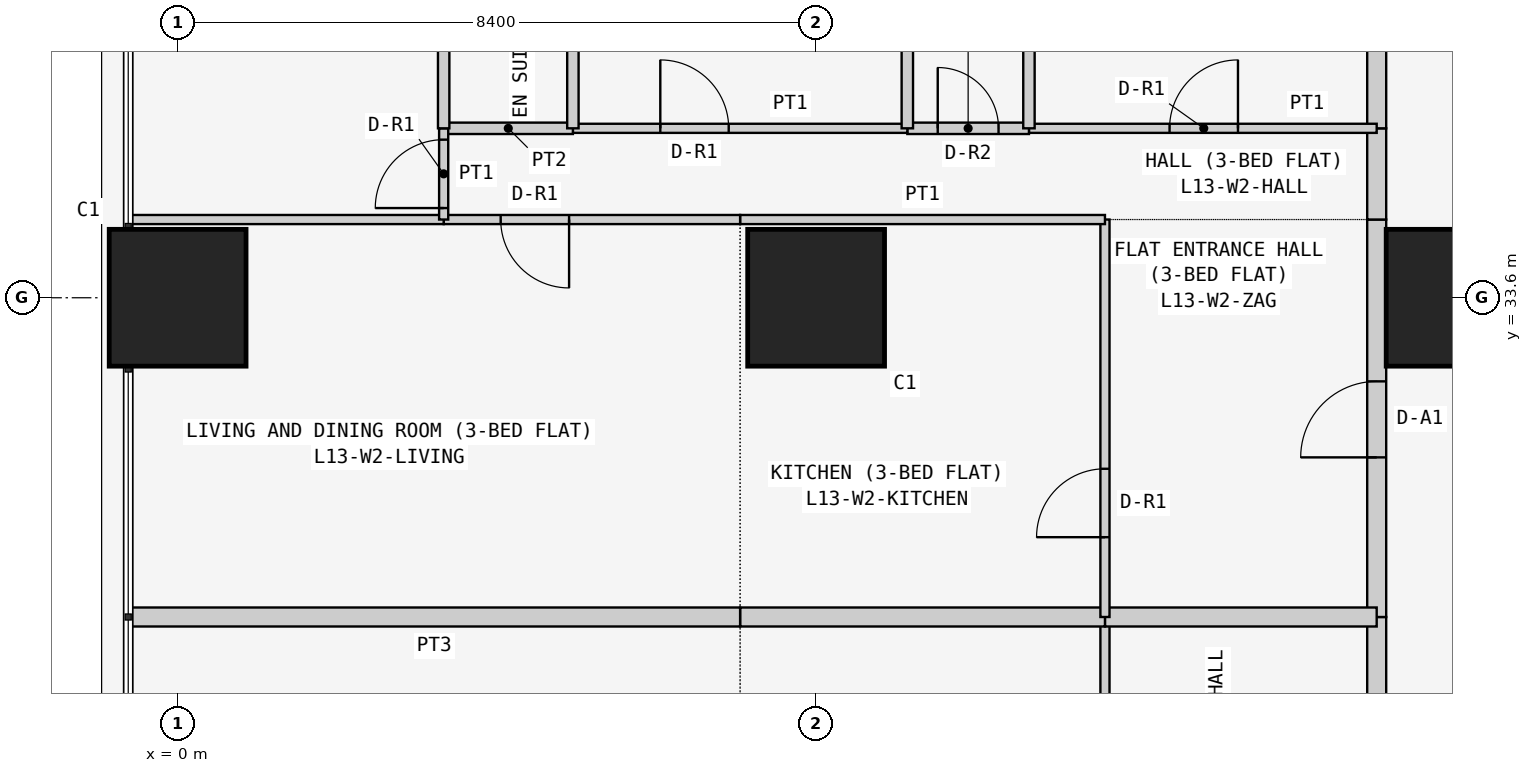
"""IFC4 building model, lengths in metres.
Left out: names, types, materials, properties, quantities, classifications, styles, units other than length and angle.
Written with IfcOpenShell. Run it as: python <this file> out.ifc"""

import sys

from ifc_helpers import new_model, si_unit, direction, frame, frame_2d, origin, origin_2d, place, context, subcontext, project, spatial, rectangle, extrude, element, fill, save


model = new_model("IFC4")
c1 = context("Model", 3, precision=1e-05, world=origin(), true_north=direction((0.0, 1.0)))
c2 = subcontext(c1, "Body", "Model", "MODEL_VIEW")
j1 = project(units=[si_unit("LENGTHUNIT", "METRE"), si_unit("PLANEANGLEUNIT", "RADIAN")], contexts=[c1])
p1 = place(None, origin())
s1 = spatial("IfcSite", under=j1, at=p1, CompositionType="ELEMENT")
p2 = place(p1, origin())
s2 = spatial("IfcBuilding", under=s1, at=p2, CompositionType="ELEMENT")
p3 = place(p2, frame((0.0, 0.0, 56.1)))
s3 = spatial("IfcBuildingStorey", under=s2, at=p3, CompositionType="ELEMENT", Elevation=56.1)
for number, where, z_axis, x_axis in (
    (1, (0.0, 33.6, 0.0), (0.0, 0.0, 1.0), (1.0, 0.0, 0.0)),
    (2, (8.4, 33.6, 0.0), (0.0, 0.0, 1.0), (1.0, 0.0, 0.0)),
    (3, (16.8, 33.6, 0.0), (0.0, 0.0, 1.0), (1.0, 0.0, 0.0)),
):
    element("IfcColumn", number, at=place(p3, frame(where, z_axis=z_axis, x_axis=x_axis)), inside=s3, PredefinedType="COLUMN", context=c2, shape_type="SweptSolid", body=[
        extrude(rectangle(XDim=1.8, YDim=1.8, at=origin_2d()), origin(), (0.0, 0.0, 1.0), 3.6),
    ])
p4 = place(p3, frame((15.775, 24.171, 0.0), z_axis=(0.0, 0.0, 1.0), x_axis=(0.0, 1.0, 0.0)))
e4 = element("IfcWall", 4, at=p4, inside=s3, PredefinedType="PARTITIONING", context=c2, shape_type="SweptSolid", body=[
    extrude(rectangle(XDim=5.229, YDim=0.25, at=frame_2d((2.615, 0.0))), origin(), (0.0, 0.0, 1.0), 3.45),
])
p5 = place(p4, frame((2.129, 0.0, 0.0)))
e5 = element("IfcOpeningElement", 5, at=p5, cuts=e4, PredefinedType="OPENING", context=c2, shape_type="SweptSolid", body=[
    extrude(rectangle(XDim=1.0, YDim=2.1, at=frame_2d((0.5, 1.05))), frame((0.0, 0.135, 0.0), z_axis=(0.0, -1.0, 0.0), x_axis=(1.0, 0.0, 0.0)), (0.0, 0.0, 1.0), 0.27),
])
p6 = place(p3, frame((15.775, 29.4, 0.0), z_axis=(0.0, 0.0, 1.0), x_axis=(0.0, 1.0, 0.0)))
e6 = element("IfcWall", 6, at=p6, inside=s3, PredefinedType="PARTITIONING", context=c2, shape_type="SweptSolid", body=[
    extrude(rectangle(XDim=5.229, YDim=0.25, at=frame_2d((2.615, 0.0))), origin(), (0.0, 0.0, 1.0), 3.45),
])
p7 = place(p6, frame((2.1, 0.0, 0.0)))
e7 = element("IfcOpeningElement", 7, at=p7, cuts=e6, PredefinedType="OPENING", context=c2, shape_type="SweptSolid", body=[
    extrude(rectangle(XDim=1.0, YDim=2.1, at=frame_2d((0.5, 1.05))), frame((0.0, 0.135, 0.0), z_axis=(0.0, -1.0, 0.0), x_axis=(1.0, 0.0, 0.0)), (0.0, 0.0, 1.0), 0.27),
])
p8 = place(p3, frame((15.775, 34.629, 0.0), z_axis=(0.0, 0.0, 1.0), x_axis=(0.0, 1.0, 0.0)))
e8 = element("IfcWall", 8, at=p8, inside=s3, PredefinedType="PARTITIONING", context=c2, shape_type="SweptSolid", body=[
    extrude(rectangle(XDim=1.2, YDim=0.25, at=frame_2d((0.6, 0.0))), origin(), (0.0, 0.0, 1.0), 3.45),
])
p9 = place(p3, frame((15.775, 35.829, 0.0), z_axis=(0.0, 0.0, 1.0), x_axis=(0.0, 1.0, 0.0)))
e9 = element("IfcWall", 9, at=p9, inside=s3, PredefinedType="PARTITIONING", context=c2, shape_type="SweptSolid", body=[
    extrude(rectangle(XDim=6.871, YDim=0.25, at=frame_2d((3.436, 0.0))), origin(), (0.0, 0.0, 1.0), 3.45),
])
p10 = place(p3, frame((12.2, 29.4, 0.0), z_axis=(0.0, 0.0, 1.0), x_axis=(0.0, -1.0, 0.0)))
e10 = element("IfcWall", 10, at=p10, inside=s3, PredefinedType="PARTITIONING", context=c2, shape_type="SweptSolid", body=[
    extrude(rectangle(XDim=5.229, YDim=0.12, at=frame_2d((2.615, 0.0))), origin(), (0.0, 0.0, 1.0), 3.45),
])
p11 = place(p10, frame((1.05, 0.0, 0.0)))
e11 = element("IfcOpeningElement", 11, at=p11, cuts=e10, PredefinedType="OPENING", context=c2, shape_type="SweptSolid", body=[
    extrude(rectangle(XDim=0.9, YDim=2.1, at=frame_2d((0.45, 1.05))), frame((0.0, 0.07, 0.0), z_axis=(0.0, -1.0, 0.0), x_axis=(1.0, 0.0, 0.0)), (0.0, 0.0, 1.0), 0.14),
])
p12 = place(p3, frame((15.775, 29.4, 0.0), z_axis=(0.0, 0.0, 1.0), x_axis=(-1.0, 0.0, 0.0)))
e12 = element("IfcWall", 12, at=p12, inside=s3, PredefinedType="PARTITIONING", context=c2, shape_type="SweptSolid", body=[
    extrude(rectangle(XDim=3.575, YDim=0.25, at=frame_2d((1.788, 0.0))), origin(), (0.0, 0.0, 1.0), 3.45),
])
p13 = place(p3, frame((12.2, 29.4, 0.0), z_axis=(0.0, 0.0, 1.0), x_axis=(-1.0, 0.0, 0.0)))
e13 = element("IfcWall", 13, at=p13, inside=s3, PredefinedType="PARTITIONING", context=c2, shape_type="SweptSolid", body=[
    extrude(rectangle(XDim=4.8, YDim=0.25, at=frame_2d((2.4, 0.0))), origin(), (0.0, 0.0, 1.0), 3.45),
])
p14 = place(p3, frame((7.4, 29.4, 0.0), z_axis=(0.0, 0.0, 1.0), x_axis=(-1.0, 0.0, 0.0)))
e14 = element("IfcWall", 14, at=p14, inside=s3, PredefinedType="PARTITIONING", context=c2, shape_type="SweptSolid", body=[
    extrude(rectangle(XDim=8.05, YDim=0.25, at=frame_2d((4.025, 0.0))), origin(), (0.0, 0.0, 1.0), 3.45),
])
p15 = place(p3, frame((12.2, 29.4, 0.0), z_axis=(0.0, 0.0, 1.0), x_axis=(0.0, 1.0, 0.0)))
e15 = element("IfcWall", 15, at=p15, inside=s3, PredefinedType="PARTITIONING", context=c2, shape_type="SweptSolid", body=[
    extrude(rectangle(XDim=5.229, YDim=0.12, at=frame_2d((2.615, 0.0))), origin(), (0.0, 0.0, 1.0), 3.45),
])
p16 = place(p15, frame((1.05, 0.0, 0.0)))
e16 = element("IfcOpeningElement", 16, at=p16, cuts=e15, PredefinedType="OPENING", context=c2, shape_type="SweptSolid", body=[
    extrude(rectangle(XDim=0.9, YDim=2.1, at=frame_2d((0.45, 1.05))), frame((0.0, 0.07, 0.0), z_axis=(0.0, -1.0, 0.0), x_axis=(1.0, 0.0, 0.0)), (0.0, 0.0, 1.0), 0.14),
])
p17 = place(p3, frame((7.4, 34.629, 0.0), z_axis=(0.0, 0.0, 1.0), x_axis=(1.0, 0.0, 0.0)))
e17 = element("IfcWall", 17, at=p17, inside=s3, PredefinedType="PARTITIONING", context=c2, shape_type="SweptSolid", body=[
    extrude(rectangle(XDim=4.8, YDim=0.12, at=frame_2d((2.4, 0.0))), origin(), (0.0, 0.0, 1.0), 3.45),
])
p18 = place(p3, frame((3.5, 34.629, 0.0), z_axis=(0.0, 0.0, 1.0), x_axis=(1.0, 0.0, 0.0)))
e18 = element("IfcWall", 18, at=p18, inside=s3, PredefinedType="PARTITIONING", context=c2, shape_type="SweptSolid", body=[
    extrude(rectangle(XDim=3.9, YDim=0.12, at=frame_2d((1.95, 0.0))), origin(), (0.0, 0.0, 1.0), 3.45),
])
p19 = place(p18, frame((0.75, 0.0, 0.0)))
e19 = element("IfcOpeningElement", 19, at=p19, cuts=e18, PredefinedType="OPENING", context=c2, shape_type="SweptSolid", body=[
    extrude(rectangle(XDim=0.9, YDim=2.1, at=frame_2d((0.45, 1.05))), frame((0.0, 0.07, 0.0), z_axis=(0.0, -1.0, 0.0), x_axis=(1.0, 0.0, 0.0)), (0.0, 0.0, 1.0), 0.14),
])
p20 = place(p3, frame((-0.65, 34.629, 0.0), z_axis=(0.0, 0.0, 1.0), x_axis=(1.0, 0.0, 0.0)))
e20 = element("IfcWall", 20, at=p20, inside=s3, PredefinedType="PARTITIONING", context=c2, shape_type="SweptSolid", body=[
    extrude(rectangle(XDim=4.15, YDim=0.12, at=frame_2d((2.075, 0.0))), origin(), (0.0, 0.0, 1.0), 3.45),
])
p21 = place(p3, frame((11.2, 35.829, 0.0), z_axis=(0.0, 0.0, 1.0), x_axis=(1.0, 0.0, 0.0)))
e21 = element("IfcWall", 21, at=p21, inside=s3, PredefinedType="PARTITIONING", context=c2, shape_type="SweptSolid", body=[
    extrude(rectangle(XDim=4.575, YDim=0.12, at=frame_2d((2.288, 0.0))), origin(), (0.0, 0.0, 1.0), 3.45),
])
p22 = place(p21, frame((1.85, 0.0, 0.0)))
e22 = element("IfcOpeningElement", 22, at=p22, cuts=e21, PredefinedType="OPENING", context=c2, shape_type="SweptSolid", body=[
    extrude(rectangle(XDim=0.9, YDim=2.1, at=frame_2d((0.45, 1.05))), frame((0.0, 0.07, 0.0), z_axis=(0.0, -1.0, 0.0), x_axis=(1.0, 0.0, 0.0)), (0.0, 0.0, 1.0), 0.14),
])
p23 = place(p3, frame((9.6, 35.829, 0.0), z_axis=(0.0, 0.0, 1.0), x_axis=(1.0, 0.0, 0.0)))
e23 = element("IfcWall", 23, at=p23, inside=s3, PredefinedType="PARTITIONING", context=c2, shape_type="SweptSolid", body=[
    extrude(rectangle(XDim=1.6, YDim=0.15, at=frame_2d((0.8, 0.0))), origin(), (0.0, 0.0, 1.0), 3.45),
])
p24 = place(p23, frame((0.4, 0.0, 0.0)))
e24 = element("IfcOpeningElement", 24, at=p24, cuts=e23, PredefinedType="OPENING", context=c2, shape_type="SweptSolid", body=[
    extrude(rectangle(XDim=0.8, YDim=2.1, at=frame_2d((0.4, 1.05))), frame((0.0, 0.085, 0.0), z_axis=(0.0, -1.0, 0.0), x_axis=(1.0, 0.0, 0.0)), (0.0, 0.0, 1.0), 0.17),
])
p25 = place(p3, frame((5.2, 35.829, 0.0), z_axis=(0.0, 0.0, 1.0), x_axis=(1.0, 0.0, 0.0)))
e25 = element("IfcWall", 25, at=p25, inside=s3, PredefinedType="PARTITIONING", context=c2, shape_type="SweptSolid", body=[
    extrude(rectangle(XDim=4.4, YDim=0.12, at=frame_2d((2.2, 0.0))), origin(), (0.0, 0.0, 1.0), 3.45),
])
p26 = place(p25, frame((1.15, 0.0, 0.0)))
e26 = element("IfcOpeningElement", 26, at=p26, cuts=e25, PredefinedType="OPENING", context=c2, shape_type="SweptSolid", body=[
    extrude(rectangle(XDim=0.9, YDim=2.1, at=frame_2d((0.45, 1.05))), frame((0.0, 0.07, 0.0), z_axis=(0.0, -1.0, 0.0), x_axis=(1.0, 0.0, 0.0)), (0.0, 0.0, 1.0), 0.14),
])
p27 = place(p3, frame((3.5, 35.829, 0.0), z_axis=(0.0, 0.0, 1.0), x_axis=(1.0, 0.0, 0.0)))
e27 = element("IfcWall", 27, at=p27, inside=s3, PredefinedType="PARTITIONING", context=c2, shape_type="SweptSolid", body=[
    extrude(rectangle(XDim=1.7, YDim=0.15, at=frame_2d((0.85, 0.0))), origin(), (0.0, 0.0, 1.0), 3.45),
])
p28 = place(p3, frame((3.5, 34.629, 0.0), z_axis=(0.0, 0.0, 1.0), x_axis=(0.0, 1.0, 0.0)))
e28 = element("IfcWall", 28, at=p28, inside=s3, PredefinedType="PARTITIONING", context=c2, shape_type="SweptSolid", body=[
    extrude(rectangle(XDim=1.2, YDim=0.12, at=frame_2d((0.6, 0.0))), origin(), (0.0, 0.0, 1.0), 3.45),
])
p29 = place(p28, frame((0.151, 0.0, 0.0)))
e29 = element("IfcOpeningElement", 29, at=p29, cuts=e28, PredefinedType="OPENING", context=c2, shape_type="SweptSolid", body=[
    extrude(rectangle(XDim=0.9, YDim=2.1, at=frame_2d((0.45, 1.05))), frame((0.0, 0.07, 0.0), z_axis=(0.0, -1.0, 0.0), x_axis=(1.0, 0.0, 0.0)), (0.0, 0.0, 1.0), 0.14),
])
for number, where, z_axis, x_axis in (
    (30, (11.2, 35.829, 0.0), (0.0, 0.0, 1.0), (0.0, 1.0, 0.0)),
    (31, (9.6, 35.829, 0.0), (0.0, 0.0, 1.0), (0.0, 1.0, 0.0)),
    (32, (5.2, 35.829, 0.0), (0.0, 0.0, 1.0), (0.0, 1.0, 0.0)),
):
    element("IfcWall", number, at=place(p3, frame(where, z_axis=z_axis, x_axis=x_axis)), inside=s3, PredefinedType="PARTITIONING", context=c2, shape_type="SweptSolid", body=[
        extrude(rectangle(XDim=6.871, YDim=0.15, at=frame_2d((3.436, 0.0))), origin(), (0.0, 0.0, 1.0), 3.45),
    ])
p30 = place(p3, frame((3.5, 35.829, 0.0), z_axis=(0.0, 0.0, 1.0), x_axis=(0.0, 1.0, 0.0)))
e33 = element("IfcWall", 33, at=p30, inside=s3, PredefinedType="PARTITIONING", context=c2, shape_type="SweptSolid", body=[
    extrude(rectangle(XDim=6.871, YDim=0.15, at=frame_2d((3.436, 0.0))), origin(), (0.0, 0.0, 1.0), 3.45),
])
p31 = place(p30, frame((3.171, 0.0, 0.0)))
e34 = element("IfcOpeningElement", 34, at=p31, cuts=e33, PredefinedType="OPENING", context=c2, shape_type="SweptSolid", body=[
    extrude(rectangle(XDim=0.8, YDim=2.1, at=frame_2d((0.4, 1.05))), frame((0.0, 0.085, 0.0), z_axis=(0.0, -1.0, 0.0), x_axis=(1.0, 0.0, 0.0)), (0.0, 0.0, 1.0), 0.17),
])
p32 = place(p7, origin())
e35 = element("IfcDoor", 35, at=p32, inside=s3, OperationType="SINGLE_SWING_LEFT", PredefinedType="DOOR", context=c2, shape_type="SweptSolid", body=[
    extrude(rectangle(XDim=1.0, YDim=2.1, at=frame_2d((0.5, 1.05))), frame((0.0, 0.025, 0.0), z_axis=(0.0, -1.0, 0.0), x_axis=(1.0, 0.0, 0.0)), (0.0, 0.0, 1.0), 0.05),
])
fill(e7, e35)
p33 = place(p16, origin())
e36 = element("IfcDoor", 36, at=p33, inside=s3, OperationType="SINGLE_SWING_LEFT", PredefinedType="DOOR", context=c2, shape_type="SweptSolid", body=[
    extrude(rectangle(XDim=0.9, YDim=2.1, at=frame_2d((0.45, 1.05))), frame((0.0, 0.025, 0.0), z_axis=(0.0, -1.0, 0.0), x_axis=(1.0, 0.0, 0.0)), (0.0, 0.0, 1.0), 0.05),
])
fill(e16, e36)
p34 = place(p19, frame((0.9, 0.0, 0.0), z_axis=(0.0, 0.0, 1.0), x_axis=(-1.0, 0.0, 0.0)))
e37 = element("IfcDoor", 37, at=p34, inside=s3, OperationType="SINGLE_SWING_LEFT", PredefinedType="DOOR", context=c2, shape_type="SweptSolid", body=[
    extrude(rectangle(XDim=0.9, YDim=2.1, at=frame_2d((0.45, 1.05))), frame((0.0, 0.025, 0.0), z_axis=(0.0, -1.0, 0.0), x_axis=(1.0, 0.0, 0.0)), (0.0, 0.0, 1.0), 0.05),
])
fill(e19, e37)
p35 = place(p22, origin())
e38 = element("IfcDoor", 38, at=p35, inside=s3, OperationType="SINGLE_SWING_RIGHT", PredefinedType="DOOR", context=c2, shape_type="SweptSolid", body=[
    extrude(rectangle(XDim=0.9, YDim=2.1, at=frame_2d((0.45, 1.05))), frame((0.0, 0.025, 0.0), z_axis=(0.0, -1.0, 0.0), x_axis=(1.0, 0.0, 0.0)), (0.0, 0.0, 1.0), 0.05),
])
fill(e22, e38)
p36 = place(p24, origin())
e39 = element("IfcDoor", 39, at=p36, inside=s3, OperationType="SINGLE_SWING_LEFT", PredefinedType="DOOR", context=c2, shape_type="SweptSolid", body=[
    extrude(rectangle(XDim=0.8, YDim=2.1, at=frame_2d((0.4, 1.05))), frame((0.0, 0.025, 0.0), z_axis=(0.0, -1.0, 0.0), x_axis=(1.0, 0.0, 0.0)), (0.0, 0.0, 1.0), 0.05),
])
fill(e24, e39)
p37 = place(p26, origin())
e40 = element("IfcDoor", 40, at=p37, inside=s3, OperationType="SINGLE_SWING_LEFT", PredefinedType="DOOR", context=c2, shape_type="SweptSolid", body=[
    extrude(rectangle(XDim=0.9, YDim=2.1, at=frame_2d((0.45, 1.05))), frame((0.0, 0.025, 0.0), z_axis=(0.0, -1.0, 0.0), x_axis=(1.0, 0.0, 0.0)), (0.0, 0.0, 1.0), 0.05),
])
fill(e26, e40)
p38 = place(p29, origin())
e41 = element("IfcDoor", 41, at=p38, inside=s3, OperationType="SINGLE_SWING_LEFT", PredefinedType="DOOR", context=c2, shape_type="SweptSolid", body=[
    extrude(rectangle(XDim=0.9, YDim=2.1, at=frame_2d((0.45, 1.05))), frame((0.0, 0.025, 0.0), z_axis=(0.0, -1.0, 0.0), x_axis=(1.0, 0.0, 0.0)), (0.0, 0.0, 1.0), 0.05),
])
fill(e29, e41)
save(model, sys.argv[1])
